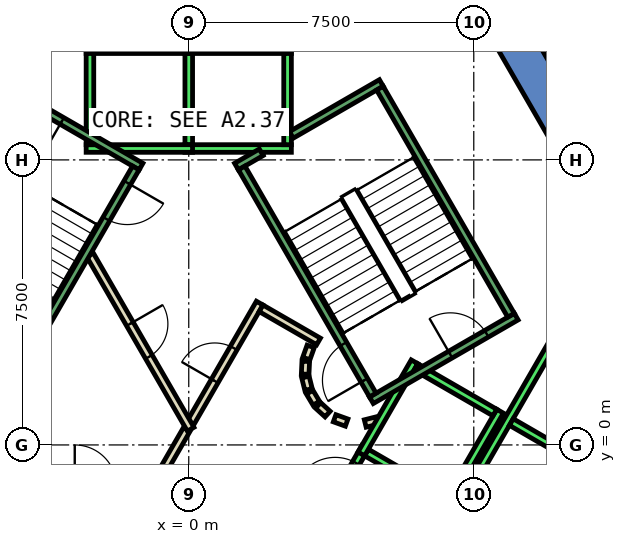
"""IFC4 building model, lengths in metres.
Left out: names, types, materials, properties, quantities, classifications, styles, units other than length and angle.
Written with IfcOpenShell. Run it as: python <this file> out.ifc"""

import sys

from ifc_helpers import new_model, si_unit, direction, frame, frame_2d, origin, place, context, subcontext, project, spatial, polyline, rectangle, outline, extrude, element, fill, save


model = new_model("IFC4")
c1 = context("Model", 3, precision=1e-05, world=origin(), true_north=direction((0.0, 1.0)))
c2 = subcontext(c1, "Body", "Model", "MODEL_VIEW")
j1 = project(units=[si_unit("LENGTHUNIT", "METRE"), si_unit("PLANEANGLEUNIT", "RADIAN")], contexts=[c1])
p1 = place(None, origin())
s1 = spatial("IfcSite", under=j1, at=p1, CompositionType="ELEMENT")
p2 = place(p1, origin())
s2 = spatial("IfcBuilding", under=s1, at=p2, CompositionType="ELEMENT")
p3 = place(p2, frame((0.0, 0.0, 180.2)))
s3 = spatial("IfcBuildingStorey", under=s2, at=p3, CompositionType="ELEMENT", Elevation=180.2)
p4 = place(p3, frame((0.0, 0.0, -0.4)))
e1 = element("IfcWall", 1, at=p4, inside=s3, PredefinedType="SHEAR", context=c2, shape_type="SweptSolid", body=[
    extrude(outline(polyline([(8.517, 11.748), (7.651, 11.248), (12.702, 2.5), (13.856, 2.5), (8.517, 11.748)])), origin(), (0.0, 0.0, 1.0), 4.0),
])
p5 = place(p3, frame((-0.866, -1.0, 0.0), z_axis=(0.0, 0.0, 1.0), x_axis=(0.500033287521, 0.866006184372, 0.0)))
e2 = element("IfcWall", 2, at=p5, inside=s3, PredefinedType="PARTITIONING", context=c2, shape_type="SweptSolid", body=[
    extrude(rectangle(XDim=1.632, YDim=0.2, at=frame_2d((0.816, 0.0))), origin(), (0.0, 0.0, 1.0), 3.6),
])
p6 = place(p3, frame((0.05, 0.587, 0.0), z_axis=(0.0, 0.0, 1.0), x_axis=(0.500028932171, 0.866008699143, 0.0)))
e3 = element("IfcWall", 3, at=p6, inside=s3, PredefinedType="PARTITIONING", context=c2, shape_type="SweptSolid", body=[
    extrude(rectangle(XDim=3.632, YDim=0.2, at=frame_2d((1.816, 0.0))), origin(), (0.0, 0.0, 1.0), 3.6),
])
p7 = place(p6, frame((1.266, 0.0, 0.0)))
e4 = element("IfcOpeningElement", 4, at=p7, cuts=e3, PredefinedType="OPENING", context=c2, shape_type="SweptSolid", body=[
    extrude(rectangle(XDim=1.0, YDim=2.1, at=frame_2d((0.5, 1.05))), frame((0.0, 0.11, 0.0), z_axis=(0.0, -1.0, 0.0), x_axis=(1.0, 0.0, 0.0)), (0.0, 0.0, 1.0), 0.22),
])
p8 = place(p3, frame((1.903, 3.595, 0.0), z_axis=(0.0, 0.0, 1.0), x_axis=(0.866239139897, -0.499629615326, 0.0)))
e5 = element("IfcWall", 5, at=p8, inside=s3, PredefinedType="PARTITIONING", context=c2, shape_type="SweptSolid", body=[
    extrude(rectangle(XDim=1.745, YDim=0.2, at=frame_2d((0.873, 0.0))), origin(), (0.0, 0.0, 1.0), 3.6),
])
p9 = place(p3, frame((3.208, 2.592, 0.0), z_axis=(0.0, 0.0, 1.0), x_axis=(-0.337388820924, -0.941365382578, 0.0)))
e6 = element("IfcWall", 6, at=p9, inside=s3, PredefinedType="PARTITIONING", context=c2, shape_type="SweptSolid", body=[
    extrude(rectangle(XDim=0.338, YDim=0.2, at=frame_2d((0.169, 0.0))), origin(), (0.0, 0.0, 1.0), 3.6),
])
p10 = place(p3, frame((3.079, 2.199, 0.0), z_axis=(0.0, 0.0, 1.0), x_axis=(-0.047771483479, -0.998858290933, 0.0)))
e7 = element("IfcWall", 7, at=p10, inside=s3, PredefinedType="PARTITIONING", context=c2, shape_type="SweptSolid", body=[
    extrude(rectangle(XDim=0.337, YDim=0.2, at=frame_2d((0.169, 0.0))), origin(), (0.0, 0.0, 1.0), 3.6),
])
p11 = place(p3, frame((3.07, 1.786, 0.0), z_axis=(0.0, 0.0, 1.0), x_axis=(0.242705583207, -0.970099994784, 0.0)))
e8 = element("IfcWall", 8, at=p11, inside=s3, PredefinedType="PARTITIONING", context=c2, shape_type="SweptSolid", body=[
    extrude(rectangle(XDim=0.338, YDim=0.2, at=frame_2d((0.169, 0.0))), origin(), (0.0, 0.0, 1.0), 3.6),
])
for number, where, z_axis, x_axis in (
    (9, (3.182, 1.388, 0.0), (0.0, 0.0, 1.0), (0.512, -0.859, 0.0)),
    (10, (3.404, 1.039, 0.0), (0.0, 0.0, 1.0), (0.74, -0.672, 0.0)),
):
    element("IfcWall", number, at=place(p3, frame(where, z_axis=z_axis, x_axis=x_axis)), inside=s3, PredefinedType="PARTITIONING", context=c2, shape_type="SweptSolid", body=[
        extrude(rectangle(XDim=0.338, YDim=0.2, at=frame_2d((0.169, 0.0))), origin(), (0.0, 0.0, 1.0), 3.6),
    ])
p12 = place(p3, frame((3.838, 0.702, 0.0), z_axis=(0.0, 0.0, 1.0), x_axis=(0.941035081519, -0.338308993895, 0.0)))
e11 = element("IfcWall", 11, at=p12, inside=s3, PredefinedType="PARTITIONING", context=c2, shape_type="SweptSolid", body=[
    extrude(rectangle(XDim=0.337, YDim=0.2, at=frame_2d((0.168, 0.0))), origin(), (0.0, 0.0, 1.0), 3.6),
])
p13 = place(p3, frame((4.644, 0.564, 0.0), z_axis=(0.0, 0.0, 1.0), x_axis=(0.970004408322, 0.243087325534, 0.0)))
e12 = element("IfcWall", 12, at=p13, inside=s3, PredefinedType="PARTITIONING", context=c2, shape_type="SweptSolid", body=[
    extrude(rectangle(XDim=0.312, YDim=0.2, at=frame_2d((0.156, 0.0))), origin(), (0.0, 0.0, 1.0), 3.6),
])
p14 = place(p3, frame((-2.598, 5.0, 0.0), z_axis=(0.0, 0.0, 1.0), x_axis=(0.49995654735, -0.86605048973, 0.0)))
e13 = element("IfcWall", 13, at=p14, inside=s3, PredefinedType="PARTITIONING", context=c2, shape_type="SweptSolid", body=[
    extrude(rectangle(XDim=5.296, YDim=0.2, at=frame_2d((2.648, 0.0))), origin(), (0.0, 0.0, 1.0), 3.6),
])
p15 = place(p14, frame((2.098, 0.0, 0.0)))
e14 = element("IfcOpeningElement", 14, at=p15, cuts=e13, PredefinedType="OPENING", context=c2, shape_type="SweptSolid", body=[
    extrude(rectangle(XDim=1.0, YDim=2.1, at=frame_2d((0.5, 1.05))), frame((0.0, 0.11, 0.0), z_axis=(0.0, -1.0, 0.0), x_axis=(1.0, 0.0, 0.0)), (0.0, 0.0, 1.0), 0.22),
])
p16 = place(p3, frame((3.24, -2.488, 0.0), z_axis=(0.0, 0.0, 1.0), x_axis=(0.49994636267, 0.866056369097, 0.0)))
e15 = element("IfcWall", 15, at=p16, inside=s3, PredefinedType="STANDARD", context=c2, shape_type="SweptSolid", body=[
    extrude(rectangle(XDim=2.8, YDim=0.2, at=frame_2d((1.4, 0.0))), origin(), (0.0, 0.0, 1.0), 3.6),
])
p17 = place(p16, frame((1.225, 0.0, 0.0)))
e16 = element("IfcOpeningElement", 16, at=p17, cuts=e15, PredefinedType="OPENING", context=c2, shape_type="SweptSolid", body=[
    extrude(rectangle(XDim=1.1, YDim=2.1, at=frame_2d((0.55, 1.05))), frame((0.0, 0.11, 0.0), z_axis=(0.0, -1.0, 0.0), x_axis=(1.0, 0.0, 0.0)), (0.0, 0.0, 1.0), 0.22),
])
p18 = place(p3, frame((4.677, -0.2, 0.0), z_axis=(0.0, 0.0, 1.0), x_axis=(0.865973769406, -0.500089422704, 0.0)))
e17 = element("IfcWall", 17, at=p18, inside=s3, PredefinedType="STANDARD", context=c2, shape_type="SweptSolid", body=[
    extrude(rectangle(XDim=2.399, YDim=0.2, at=frame_2d((1.2, 0.0))), origin(), (0.0, 0.0, 1.0), 3.6),
])
p19 = place(p3, frame((4.451, -6.19, 0.0), z_axis=(0.0, 0.0, 1.0), x_axis=(0.50000090737, 0.866024879913, 0.0)))
e18 = element("IfcWall", 18, at=p19, inside=s3, PredefinedType="STANDARD", context=c2, shape_type="SweptSolid", body=[
    extrude(rectangle(XDim=10.6, YDim=0.2, at=frame_2d((5.3, 0.0))), origin(), (0.0, 0.0, 1.0), 3.6),
])
p20 = place(p3, frame((8.488, 0.602, 0.0), z_axis=(0.0, 0.0, 1.0), x_axis=(0.866022959057, -0.500004234368, 0.0)))
e19 = element("IfcWall", 19, at=p20, inside=s3, PredefinedType="STANDARD", context=c2, shape_type="SweptSolid", body=[
    extrude(rectangle(XDim=2.5, YDim=0.2, at=frame_2d((1.25, 0.0))), origin(), (0.0, 0.0, 1.0), 3.6),
])
for number, where, z_axis, x_axis in (
    (20, (2.7, 7.8, 0.0), (0.0, 0.0, 1.0), (-1.0, 0.0, 0.0)),
    (21, (2.7, 10.4, 0.0), (0.0, 0.0, 1.0), (-1.0, 0.0, 0.0)),
):
    element("IfcWall", number, at=place(p3, frame(where, z_axis=z_axis, x_axis=x_axis)), inside=s3, PredefinedType="STANDARD", context=c2, shape_type="SweptSolid", body=[
        extrude(rectangle(XDim=2.8, YDim=0.2, at=frame_2d((1.4, 0.0))), origin(), (0.0, 0.0, 1.0), 2.3),
    ])
for number, where, z_axis, x_axis in (
    (22, (2.6, 7.9, 0.0), (0.0, 0.0, 1.0), (0.0, 1.0, 0.0)),
    (23, (0.0, 7.9, 0.0), (0.0, 0.0, 1.0), (0.0, 1.0, 0.0)),
):
    element("IfcWall", number, at=place(p3, frame(where, z_axis=z_axis, x_axis=x_axis)), inside=s3, PredefinedType="STANDARD", context=c2, shape_type="SweptSolid", body=[
        extrude(rectangle(XDim=2.4, YDim=0.2, at=frame_2d((1.2, 0.0))), origin(), (0.0, 0.0, 1.0), 2.3),
    ])
for number, where, z_axis, x_axis in (
    (24, (0.1, 7.8, 0.0), (0.0, 0.0, 1.0), (-1.0, 0.0, 0.0)),
    (25, (0.1, 10.4, 0.0), (0.0, 0.0, 1.0), (-1.0, 0.0, 0.0)),
):
    element("IfcWall", number, at=place(p3, frame(where, z_axis=z_axis, x_axis=x_axis)), inside=s3, PredefinedType="STANDARD", context=c2, shape_type="SweptSolid", body=[
        extrude(rectangle(XDim=2.8, YDim=0.2, at=frame_2d((1.4, 0.0))), origin(), (0.0, 0.0, 1.0), 2.3),
    ])
p21 = place(p3, frame((-2.6, 7.9, 0.0), z_axis=(0.0, 0.0, 1.0), x_axis=(0.0, 1.0, 0.0)))
e26 = element("IfcWall", 26, at=p21, inside=s3, PredefinedType="STANDARD", context=c2, shape_type="SweptSolid", body=[
    extrude(rectangle(XDim=2.4, YDim=0.2, at=frame_2d((1.2, 0.0))), origin(), (0.0, 0.0, 1.0), 2.3),
])
for number, where, z_axis, x_axis in (
    (27, (4.54, -0.237, 0.0), (0.0, 0.0, 1.0), (0.5, 0.866, 0.0)),
    (28, (6.792, -1.537, 0.0), (0.0, 0.0, 1.0), (0.5, 0.866, 0.0)),
):
    element("IfcWall", number, at=place(p3, frame(where, z_axis=z_axis, x_axis=x_axis)), inside=s3, PredefinedType="STANDARD", context=c2, shape_type="SweptSolid", body=[
        extrude(rectangle(XDim=2.8, YDim=0.2, at=frame_2d((1.4, 0.0))), origin(), (0.0, 0.0, 1.0), 2.3),
    ])
p22 = place(p3, frame((5.977, 2.052, 0.0), z_axis=(0.0, 0.0, 1.0), x_axis=(0.865973769406, -0.500089422704, 0.0)))
e29 = element("IfcWall", 29, at=p22, inside=s3, PredefinedType="STANDARD", context=c2, shape_type="SweptSolid", body=[
    extrude(rectangle(XDim=2.399, YDim=0.2, at=frame_2d((1.2, 0.0))), origin(), (0.0, 0.0, 1.0), 2.3),
])
p23 = place(p3, frame((-4.64, -0.063, 0.0), z_axis=(0.0, 0.0, 1.0), x_axis=(0.49994636267, -0.866056369097, 0.0)))
e30 = element("IfcWall", 30, at=p23, inside=s3, PredefinedType="STANDARD", context=c2, shape_type="SweptSolid", body=[
    extrude(rectangle(XDim=2.8, YDim=0.2, at=frame_2d((1.4, 0.0))), origin(), (0.0, 0.0, 1.0), 2.3),
])
p24 = place(p3, frame((4.806, 1.176, 0.0), z_axis=(0.0, 0.0, 1.0), x_axis=(0.866059941101, 0.499940174841, 0.0)))
e31 = element("IfcWall", 31, at=p24, inside=s3, PredefinedType="STANDARD", context=c2, shape_type="SweptSolid", body=[
    extrude(rectangle(XDim=4.4, YDim=0.2, at=frame_2d((2.2, 0.0))), origin(), (0.0, 0.0, 1.0), 3.6),
])
p25 = place(p24, frame((2.4, 0.0, 0.0)))
e32 = element("IfcOpeningElement", 32, at=p25, cuts=e31, PredefinedType="OPENING", context=c2, shape_type="SweptSolid", body=[
    extrude(rectangle(XDim=1.1, YDim=2.2, at=frame_2d((0.55, 1.1))), frame((0.0, 0.11, 0.0), z_axis=(0.0, -1.0, 0.0), x_axis=(1.0, 0.0, 0.0)), (0.0, 0.0, 1.0), 0.22),
])
p26 = place(p3, frame((2.7, 8.158, 0.0), z_axis=(0.0, 0.0, 1.0), x_axis=(0.86611865017, 0.499838457731, 0.0)))
e33 = element("IfcWall", 33, at=p26, inside=s3, PredefinedType="STANDARD", context=c2, shape_type="SweptSolid", body=[
    extrude(rectangle(XDim=2.733, YDim=0.2, at=frame_2d((1.366, 0.0))), origin(), (0.0, 0.0, 1.0), 3.6),
])
p27 = place(p3, frame((1.256, 7.324, 0.0), z_axis=(0.0, 0.0, 1.0), x_axis=(0.865915093549, 0.500191014278, 0.0)))
e34 = element("IfcWall", 34, at=p27, inside=s3, PredefinedType="STANDARD", context=c2, shape_type="SweptSolid", body=[
    extrude(rectangle(XDim=0.752, YDim=0.2, at=frame_2d((0.376, 0.0))), origin(), (0.0, 0.0, 1.0), 3.6),
])
p28 = place(p3, frame((4.843, 1.312, 0.0), z_axis=(0.0, 0.0, 1.0), x_axis=(-0.499963383562, 0.866046543262, 0.0)))
e35 = element("IfcWall", 35, at=p28, inside=s3, PredefinedType="STANDARD", context=c2, shape_type="SweptSolid", body=[
    extrude(rectangle(XDim=6.9, YDim=0.2, at=frame_2d((3.45, 0.0))), origin(), (0.0, 0.0, 1.0), 3.6),
])
p29 = place(p28, frame((0.45, 0.0, 0.0)))
e36 = element("IfcOpeningElement", 36, at=p29, cuts=e35, PredefinedType="OPENING", context=c2, shape_type="SweptSolid", body=[
    extrude(rectangle(XDim=1.1, YDim=2.2, at=frame_2d((0.55, 1.1))), frame((0.0, 0.11, 0.0), z_axis=(0.0, -1.0, 0.0), x_axis=(1.0, 0.0, 0.0)), (0.0, 0.0, 1.0), 0.22),
])
p30 = place(p3, frame((8.48, 3.412, 0.0), z_axis=(0.0, 0.0, 1.0), x_axis=(-0.499978703459, 0.866037698999, 0.0)))
e37 = element("IfcWall", 37, at=p30, inside=s3, PredefinedType="STANDARD", context=c2, shape_type="SweptSolid", body=[
    extrude(rectangle(XDim=6.9, YDim=0.2, at=frame_2d((3.45, 0.0))), origin(), (0.0, 0.0, 1.0), 3.6),
])
p31 = place(p3, frame((-1.256, 7.324, 0.0), z_axis=(0.0, 0.0, 1.0), x_axis=(-0.866046073146, 0.499964197906, 0.0)))
e38 = element("IfcWall", 38, at=p31, inside=s3, PredefinedType="STANDARD", context=c2, shape_type="SweptSolid", body=[
    extrude(rectangle(XDim=4.4, YDim=0.2, at=frame_2d((2.2, 0.0))), origin(), (0.0, 0.0, 1.0), 3.6),
])
p32 = place(p31, frame((2.4, 0.0, 0.0)))
e39 = element("IfcOpeningElement", 39, at=p32, cuts=e38, PredefinedType="OPENING", context=c2, shape_type="SweptSolid", body=[
    extrude(rectangle(XDim=1.1, YDim=2.2, at=frame_2d((0.55, 1.1))), frame((0.0, 0.11, 0.0), z_axis=(0.0, -1.0, 0.0), x_axis=(1.0, 0.0, 0.0)), (0.0, 0.0, 1.0), 0.22),
])
p33 = place(p3, frame((-1.393, 7.288, 0.0), z_axis=(0.0, 0.0, 1.0), x_axis=(-0.499963383562, -0.866046543262, 0.0)))
e40 = element("IfcWall", 40, at=p33, inside=s3, PredefinedType="STANDARD", context=c2, shape_type="SweptSolid", body=[
    extrude(rectangle(XDim=6.9, YDim=0.2, at=frame_2d((3.45, 0.0))), origin(), (0.0, 0.0, 1.0), 3.6),
])
p34 = place(p33, frame((0.45, 0.0, 0.0)))
e41 = element("IfcOpeningElement", 41, at=p34, cuts=e40, PredefinedType="OPENING", context=c2, shape_type="SweptSolid", body=[
    extrude(rectangle(XDim=1.1, YDim=2.2, at=frame_2d((0.55, 1.1))), frame((0.0, 0.11, 0.0), z_axis=(0.0, -1.0, 0.0), x_axis=(1.0, 0.0, 0.0)), (0.0, 0.0, 1.0), 0.22),
])
p35 = place(p7, origin())
e42 = element("IfcDoor", 42, at=p35, inside=s3, OperationType="SINGLE_SWING_RIGHT", PredefinedType="DOOR", context=c2, shape_type="SweptSolid", body=[
    extrude(rectangle(XDim=1.0, YDim=2.1, at=frame_2d((0.5, 1.05))), frame((0.0, 0.025, 0.0), z_axis=(0.0, -1.0, 0.0), x_axis=(1.0, 0.0, 0.0)), (0.0, 0.0, 1.0), 0.05),
])
fill(e4, e42)
p36 = place(p15, origin())
e43 = element("IfcDoor", 43, at=p36, inside=s3, OperationType="SINGLE_SWING_RIGHT", PredefinedType="DOOR", context=c2, shape_type="SweptSolid", body=[
    extrude(rectangle(XDim=1.0, YDim=2.1, at=frame_2d((0.5, 1.05))), frame((0.0, 0.025, 0.0), z_axis=(0.0, -1.0, 0.0), x_axis=(1.0, 0.0, 0.0)), (0.0, 0.0, 1.0), 0.05),
])
fill(e14, e43)
p37 = place(p17, origin())
e44 = element("IfcDoor", 44, at=p37, inside=s3, OperationType="SLIDING_TO_LEFT", PredefinedType="DOOR", context=c2, shape_type="SweptSolid", body=[
    extrude(rectangle(XDim=1.1, YDim=2.1, at=frame_2d((0.55, 1.05))), frame((0.0, 0.025, 0.0), z_axis=(0.0, -1.0, 0.0), x_axis=(1.0, 0.0, 0.0)), (0.0, 0.0, 1.0), 0.05),
])
fill(e16, e44)
p38 = place(p29, origin())
e45 = element("IfcDoor", 45, at=p38, inside=s3, OperationType="SINGLE_SWING_LEFT", PredefinedType="DOOR", context=c2, shape_type="SweptSolid", body=[
    extrude(rectangle(XDim=1.1, YDim=2.2, at=frame_2d((0.55, 1.1))), frame((0.0, 0.025, 0.0), z_axis=(0.0, -1.0, 0.0), x_axis=(1.0, 0.0, 0.0)), (0.0, 0.0, 1.0), 0.05),
])
fill(e36, e45)
p39 = place(p25, origin())
e46 = element("IfcDoor", 46, at=p39, inside=s3, OperationType="SINGLE_SWING_LEFT", PredefinedType="DOOR", context=c2, shape_type="SweptSolid", body=[
    extrude(rectangle(XDim=1.1, YDim=2.2, at=frame_2d((0.55, 1.1))), frame((0.0, 0.025, 0.0), z_axis=(0.0, -1.0, 0.0), x_axis=(1.0, 0.0, 0.0)), (0.0, 0.0, 1.0), 0.05),
])
fill(e32, e46)
p40 = place(p34, origin())
e47 = element("IfcDoor", 47, at=p40, inside=s3, OperationType="SINGLE_SWING_LEFT", PredefinedType="DOOR", context=c2, shape_type="SweptSolid", body=[
    extrude(rectangle(XDim=1.1, YDim=2.2, at=frame_2d((0.55, 1.1))), frame((0.0, 0.025, 0.0), z_axis=(0.0, -1.0, 0.0), x_axis=(1.0, 0.0, 0.0)), (0.0, 0.0, 1.0), 0.05),
])
fill(e41, e47)
p41 = place(p32, origin())
e48 = element("IfcDoor", 48, at=p41, inside=s3, OperationType="SINGLE_SWING_LEFT", PredefinedType="DOOR", context=c2, shape_type="SweptSolid", body=[
    extrude(rectangle(XDim=1.1, YDim=2.2, at=frame_2d((0.55, 1.1))), frame((0.0, 0.025, 0.0), z_axis=(0.0, -1.0, 0.0), x_axis=(1.0, 0.0, 0.0)), (0.0, 0.0, 1.0), 0.05),
])
fill(e39, e48)
save(model, sys.argv[1])
